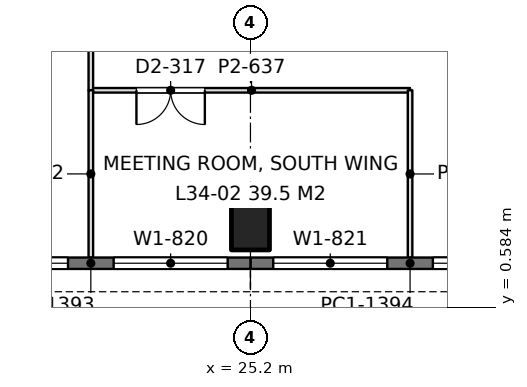
"""IFC4 building model, lengths in metres.
Left out: names, types, materials, properties, quantities, classifications, styles, units other than length and angle.
Written with IfcOpenShell. Run it as: python <this file> out.ifc"""

import sys

from ifc_helpers import new_model, si_unit, direction, frame, frame_2d, origin, origin_2d, place, context, subcontext, project, spatial, rectangle, extrude, element, fill, save


model = new_model("IFC4")
c1 = context("Model", 3, precision=1e-05, world=origin(), true_north=direction((0.0, 1.0)))
c2 = subcontext(c1, "Body", "Model", "MODEL_VIEW")
j1 = project(units=[si_unit("LENGTHUNIT", "METRE"), si_unit("PLANEANGLEUNIT", "RADIAN")], contexts=[c1])
p1 = place(None, origin())
s1 = spatial("IfcSite", under=j1, at=p1, CompositionType="ELEMENT")
p2 = place(p1, origin())
s2 = spatial("IfcBuilding", under=s1, at=p2, CompositionType="ELEMENT")
p3 = place(p2, frame((0.0, 0.0, 151.2)))
s3 = spatial("IfcBuildingStorey", under=s2, at=p3, CompositionType="ELEMENT", Elevation=151.2)
p4 = place(p3, frame((25.2, 2.8, 0.0), z_axis=(0.0, 0.0, 1.0), x_axis=(1.0, 0.0, 0.0)))
e1 = element("IfcColumn", 1, at=p4, inside=s3, PredefinedType="COLUMN", context=c2, shape_type="SweptSolid", body=[
    extrude(rectangle(XDim=1.0, YDim=1.4, at=origin_2d()), origin(), (0.0, 0.0, 1.0), 4.2),
])
p5 = place(p3, frame((33.6, 1.75, 0.0), z_axis=(0.0, 0.0, 1.0), x_axis=(-1.0, 0.0, 0.0)))
e2 = element("IfcWall", 2, at=p5, inside=s3, PredefinedType="SOLIDWALL", context=c2, shape_type="SweptSolid", body=[
    extrude(rectangle(XDim=8.4, YDim=0.3, at=frame_2d((4.2, 0.0))), origin(), (0.0, 0.0, 1.0), 4.05),
])
p6 = place(p5, frame((0.6, 0.0, 0.9)))
e3 = element("IfcOpeningElement", 3, at=p6, cuts=e2, PredefinedType="OPENING", context=c2, shape_type="SweptSolid", body=[
    extrude(rectangle(XDim=3.0, YDim=1.9, at=frame_2d((1.5, 0.95))), frame((0.0, 0.16, 0.0), z_axis=(0.0, -1.0, 0.0), x_axis=(1.0, 0.0, 0.0)), (0.0, 0.0, 1.0), 0.32),
])
p7 = place(p5, frame((4.8, 0.0, 0.9)))
e4 = element("IfcOpeningElement", 4, at=p7, cuts=e2, PredefinedType="OPENING", context=c2, shape_type="SweptSolid", body=[
    extrude(rectangle(XDim=3.0, YDim=1.9, at=frame_2d((1.5, 0.95))), frame((0.0, 0.16, 0.0), z_axis=(0.0, -1.0, 0.0), x_axis=(1.0, 0.0, 0.0)), (0.0, 0.0, 1.0), 0.32),
])
p8 = place(p3, frame((25.2, 1.75, 0.0), z_axis=(0.0, 0.0, 1.0), x_axis=(-1.0, 0.0, 0.0)))
e5 = element("IfcWall", 5, at=p8, inside=s3, PredefinedType="SOLIDWALL", context=c2, shape_type="SweptSolid", body=[
    extrude(rectangle(XDim=8.4, YDim=0.3, at=frame_2d((4.2, 0.0))), origin(), (0.0, 0.0, 1.0), 4.05),
])
p9 = place(p8, frame((0.6, 0.0, 0.9)))
e6 = element("IfcOpeningElement", 6, at=p9, cuts=e5, PredefinedType="OPENING", context=c2, shape_type="SweptSolid", body=[
    extrude(rectangle(XDim=3.0, YDim=1.9, at=frame_2d((1.5, 0.95))), frame((0.0, 0.16, 0.0), z_axis=(0.0, -1.0, 0.0), x_axis=(1.0, 0.0, 0.0)), (0.0, 0.0, 1.0), 0.32),
])
p10 = place(p8, frame((4.8, 0.0, 0.9)))
e7 = element("IfcOpeningElement", 7, at=p10, cuts=e5, PredefinedType="OPENING", context=c2, shape_type="SweptSolid", body=[
    extrude(rectangle(XDim=3.0, YDim=1.9, at=frame_2d((1.5, 0.95))), frame((0.0, 0.16, 0.0), z_axis=(0.0, -1.0, 0.0), x_axis=(1.0, 0.0, 0.0)), (0.0, 0.0, 1.0), 0.32),
])
p11 = place(p3, frame((21.058, 6.3, 0.0), z_axis=(0.0, 0.0, 1.0), x_axis=(1.0, 0.0, 0.0)))
e8 = element("IfcWall", 8, at=p11, inside=s3, PredefinedType="PARTITIONING", context=c2, shape_type="SweptSolid", body=[
    extrude(rectangle(XDim=8.342, YDim=0.12, at=frame_2d((4.171, 0.0))), origin(), (0.0, 0.0, 1.0), 3.55),
])
p12 = place(p11, frame((1.142, 0.0, 0.0)))
e9 = element("IfcOpeningElement", 9, at=p12, cuts=e8, PredefinedType="OPENING", context=c2, shape_type="SweptSolid", body=[
    extrude(rectangle(XDim=1.8, YDim=2.2, at=frame_2d((0.9, 1.1))), frame((0.0, 0.07, 0.0), z_axis=(0.0, -1.0, 0.0), x_axis=(1.0, 0.0, 0.0)), (0.0, 0.0, 1.0), 0.14),
])
p13 = place(p3, frame((21.0, 1.898, 0.0), z_axis=(0.0, 0.0, 1.0), x_axis=(0.0, 1.0, 0.0)))
e10 = element("IfcWall", 10, at=p13, inside=s3, PredefinedType="PARTITIONING", context=c2, shape_type="SweptSolid", body=[
    extrude(rectangle(XDim=4.404, YDim=0.12, at=frame_2d((2.202, 0.0))), origin(), (0.0, 0.0, 1.0), 3.56),
])
p14 = place(p3, frame((29.4, 1.898, 0.0), z_axis=(0.0, 0.0, 1.0), x_axis=(0.0, 1.0, 0.0)))
e11 = element("IfcWall", 11, at=p14, inside=s3, PredefinedType="PARTITIONING", context=c2, shape_type="SweptSolid", body=[
    extrude(rectangle(XDim=4.402, YDim=0.12, at=frame_2d((2.201, 0.0))), origin(), (0.0, 0.0, 1.0), 3.56),
])
p15 = place(p3, frame((21.0, 6.298, 0.0), z_axis=(0.0, 0.0, 1.0), x_axis=(0.0, 1.0, 0.0)))
e12 = element("IfcWall", 12, at=p15, inside=s3, PredefinedType="PARTITIONING", context=c2, shape_type="SweptSolid", body=[
    extrude(rectangle(XDim=6.244, YDim=0.12, at=frame_2d((3.122, 0.0))), origin(), (0.0, 0.0, 1.0), 3.55),
])
p16 = place(p6, origin())
e13 = element("IfcWindow", 13, at=p16, inside=s3, PartitioningType="SINGLE_PANEL", PredefinedType="WINDOW", context=c2, shape_type="SweptSolid", body=[
    extrude(rectangle(XDim=3.0, YDim=1.9, at=frame_2d((1.5, 0.95))), frame((0.0, 0.03, 0.0), z_axis=(0.0, -1.0, 0.0), x_axis=(1.0, 0.0, 0.0)), (0.0, 0.0, 1.0), 0.06),
])
fill(e3, e13)
p17 = place(p7, origin())
e14 = element("IfcWindow", 14, at=p17, inside=s3, PartitioningType="SINGLE_PANEL", PredefinedType="WINDOW", context=c2, shape_type="SweptSolid", body=[
    extrude(rectangle(XDim=3.0, YDim=1.9, at=frame_2d((1.5, 0.95))), frame((0.0, 0.03, 0.0), z_axis=(0.0, -1.0, 0.0), x_axis=(1.0, 0.0, 0.0)), (0.0, 0.0, 1.0), 0.06),
])
fill(e4, e14)
p18 = place(p9, origin())
e15 = element("IfcWindow", 15, at=p18, inside=s3, PartitioningType="SINGLE_PANEL", PredefinedType="WINDOW", context=c2, shape_type="SweptSolid", body=[
    extrude(rectangle(XDim=3.0, YDim=1.9, at=frame_2d((1.5, 0.95))), frame((0.0, 0.03, 0.0), z_axis=(0.0, -1.0, 0.0), x_axis=(1.0, 0.0, 0.0)), (0.0, 0.0, 1.0), 0.06),
])
fill(e6, e15)
p19 = place(p10, origin())
e16 = element("IfcWindow", 16, at=p19, inside=s3, PartitioningType="SINGLE_PANEL", PredefinedType="WINDOW", context=c2, shape_type="SweptSolid", body=[
    extrude(rectangle(XDim=3.0, YDim=1.9, at=frame_2d((1.5, 0.95))), frame((0.0, 0.03, 0.0), z_axis=(0.0, -1.0, 0.0), x_axis=(1.0, 0.0, 0.0)), (0.0, 0.0, 1.0), 0.06),
])
fill(e7, e16)
p20 = place(p12, frame((1.8, 0.0, 0.0), z_axis=(0.0, 0.0, 1.0), x_axis=(-1.0, 0.0, 0.0)))
e17 = element("IfcDoor", 17, at=p20, inside=s3, OperationType="DOUBLE_DOOR_SINGLE_SWING", PredefinedType="DOOR", context=c2, shape_type="SweptSolid", body=[
    extrude(rectangle(XDim=1.8, YDim=2.2, at=frame_2d((0.9, 1.1))), frame((0.0, 0.025, 0.0), z_axis=(0.0, -1.0, 0.0), x_axis=(1.0, 0.0, 0.0)), (0.0, 0.0, 1.0), 0.05),
])
fill(e9, e17)
save(model, sys.argv[1])
